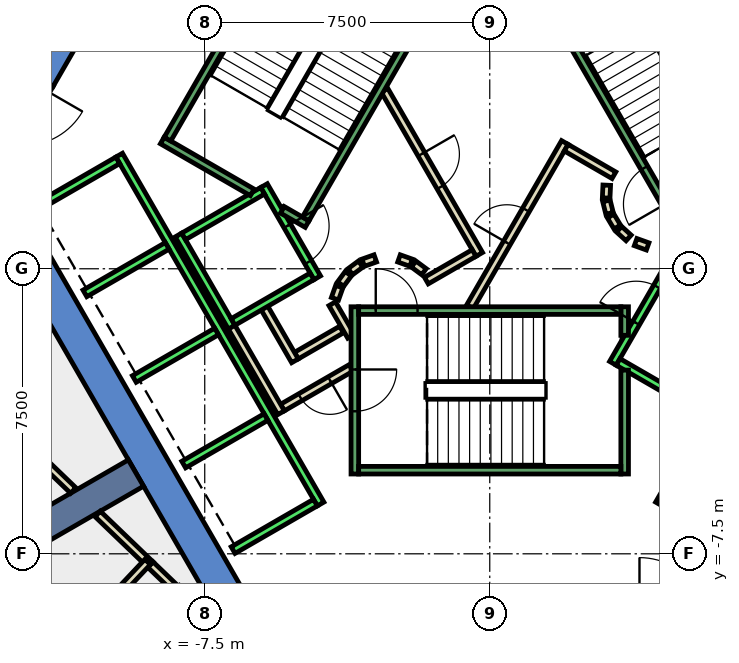
"""IFC4 building model, lengths in metres.
Left out: names, types, materials, properties, quantities, classifications, styles, units other than length and angle.
Written with IfcOpenShell. Run it as: python <this file> out.ifc"""

import sys

from ifc_helpers import new_model, si_unit, direction, frame, frame_2d, origin, place, context, subcontext, project, spatial, polyline, rectangle, outline, extrude, element, fill, save


model = new_model("IFC4")
c1 = context("Model", 3, precision=1e-05, world=origin(), true_north=direction((0.0, 1.0)))
c2 = subcontext(c1, "Body", "Model", "MODEL_VIEW")
j1 = project(units=[si_unit("LENGTHUNIT", "METRE"), si_unit("PLANEANGLEUNIT", "RADIAN")], contexts=[c1])
p1 = place(None, origin())
s1 = spatial("IfcSite", under=j1, at=p1, CompositionType="ELEMENT")
p2 = place(p1, origin())
s2 = spatial("IfcBuilding", under=s1, at=p2, CompositionType="ELEMENT")
p3 = place(p2, frame((0.0, 0.0, 107.6)))
s3 = spatial("IfcBuildingStorey", under=s2, at=p3, CompositionType="ELEMENT", Elevation=107.6)
p4 = place(p3, frame((0.0, 0.0, -0.4)))
e1 = element("IfcWall", 1, at=p4, inside=s3, PredefinedType="SHEAR", context=c2, shape_type="SweptSolid", body=[
    extrude(outline(polyline([(-12.267, 5.252), (-11.488, 4.802), (-6.409, 13.6), (-6.928, 14.5), (-12.267, 5.252)])), origin(), (0.0, 0.0, 1.0), 4.2),
])
p5 = place(p3, frame((0.0, 0.0, 3.6)))
e2 = element("IfcWall", 2, at=p5, inside=s3, PredefinedType="SHEAR", context=c2, shape_type="SweptSolid", body=[
    extrude(outline(polyline([(-13.267, 3.52), (-12.488, 3.07), (-11.488, 4.802), (-12.267, 5.252), (-13.267, 3.52)])), origin(), (0.0, 0.0, 1.0), 0.2),
])
p6 = place(p3, frame((0.0, 0.0, -0.4)))
e3 = element("IfcWall", 3, at=p6, inside=s3, PredefinedType="SHEAR", context=c2, shape_type="SweptSolid", body=[
    extrude(outline(polyline([(-13.856, 2.5), (-6.928, -9.5), (-6.409, -8.6), (-12.817, 2.5), (-13.856, 2.5)])), origin(), (0.0, 0.0, 1.0), 4.2),
])
p7 = place(p3, frame((-9.31, -5.375, -0.4), z_axis=(0.0, 0.0, 1.0), x_axis=(-0.866017533419, -0.500013631625, 0.0)))
e4 = element("IfcWall", 4, at=p7, inside=s3, PredefinedType="SHEAR", context=c2, shape_type="SweptSolid", body=[
    extrude(rectangle(XDim=9.0, YDim=0.8, at=frame_2d((4.5, 0.0))), origin(), (0.0, 0.0, 1.0), 4.2),
])
p8 = place(p3, frame((-3.9, -1.599, 0.0), z_axis=(0.0, 0.0, 1.0), x_axis=(-0.865969445389, -0.500096910261, 0.0)))
e5 = element("IfcWall", 5, at=p8, inside=s3, PredefinedType="PARTITIONING", context=c2, shape_type="SweptSolid", body=[
    extrude(rectangle(XDim=1.373, YDim=0.2, at=frame_2d((0.687, 0.0))), origin(), (0.0, 0.0, 1.0), 3.8),
])
p9 = place(p3, frame((-5.126, -2.422, 0.0), z_axis=(0.0, 0.0, 1.0), x_axis=(-0.500062241894, 0.865989465428, 0.0)))
e6 = element("IfcWall", 6, at=p9, inside=s3, PredefinedType="PARTITIONING", context=c2, shape_type="SweptSolid", body=[
    extrude(rectangle(XDim=1.7, YDim=0.2, at=frame_2d((0.85, 0.0))), origin(), (0.0, 0.0, 1.0), 3.8),
])
p10 = place(p3, frame((-3.65, -2.61, 0.0), z_axis=(0.0, 0.0, 1.0), x_axis=(-0.866072462134, -0.499918483688, 0.0)))
e7 = element("IfcWall", 7, at=p10, inside=s3, PredefinedType="PARTITIONING", context=c2, shape_type="SweptSolid", body=[
    extrude(rectangle(XDim=2.084, YDim=0.2, at=frame_2d((1.042, 0.0))), origin(), (0.0, 0.0, 1.0), 3.8),
])
p11 = place(p10, frame((0.642, 0.0, 0.0)))
e8 = element("IfcOpeningElement", 8, at=p11, cuts=e7, PredefinedType="OPENING", context=c2, shape_type="SweptSolid", body=[
    extrude(rectangle(XDim=0.9, YDim=2.1, at=frame_2d((0.45, 1.05))), frame((0.0, 0.11, 0.0), z_axis=(0.0, -1.0, 0.0), x_axis=(1.0, 0.0, 0.0)), (0.0, 0.0, 1.0), 0.22),
])
p12 = place(p3, frame((-5.492, -3.788, 0.0), z_axis=(0.0, 0.0, 1.0), x_axis=(-0.500008949224, 0.866020236886, 0.0)))
e9 = element("IfcWall", 9, at=p12, inside=s3, PredefinedType="PARTITIONING", context=c2, shape_type="SweptSolid", body=[
    extrude(rectangle(XDim=2.68, YDim=0.2, at=frame_2d((1.34, 0.0))), origin(), (0.0, 0.0, 1.0), 3.8),
])
p13 = place(p3, frame((-4.145, -0.92, 0.0), z_axis=(0.0, 0.0, 1.0), x_axis=(0.499743786207, -0.866173278362, 0.0)))
e10 = element("IfcWall", 10, at=p13, inside=s3, PredefinedType="PARTITIONING", context=c2, shape_type="SweptSolid", body=[
    extrude(rectangle(XDim=0.991, YDim=0.2, at=frame_2d((0.495, 0.0))), origin(), (0.0, 0.0, 1.0), 3.8),
])
p14 = place(p3, frame((-0.52, -1.0, 0.0), z_axis=(0.0, 0.0, 1.0), x_axis=(0.50011622646, 0.865958290007, 0.0)))
e11 = element("IfcWall", 11, at=p14, inside=s3, PredefinedType="PARTITIONING", context=c2, shape_type="SweptSolid", body=[
    extrude(rectangle(XDim=4.991, YDim=0.2, at=frame_2d((2.496, 0.0))), origin(), (0.0, 0.0, 1.0), 3.8),
])
p15 = place(p14, frame((1.945, 0.0, 0.0)))
e12 = element("IfcOpeningElement", 12, at=p15, cuts=e11, PredefinedType="OPENING", context=c2, shape_type="SweptSolid", body=[
    extrude(rectangle(XDim=1.0, YDim=2.1, at=frame_2d((0.5, 1.05))), frame((0.0, 0.11, 0.0), z_axis=(0.0, -1.0, 0.0), x_axis=(1.0, 0.0, 0.0)), (0.0, 0.0, 1.0), 0.22),
])
p16 = place(p3, frame((2.012, 3.186, 0.0), z_axis=(0.0, 0.0, 1.0), x_axis=(0.865891012941, -0.500232699559, 0.0)))
e13 = element("IfcWall", 13, at=p16, inside=s3, PredefinedType="PARTITIONING", context=c2, shape_type="SweptSolid", body=[
    extrude(rectangle(XDim=1.449, YDim=0.2, at=frame_2d((0.725, 0.0))), origin(), (0.0, 0.0, 1.0), 3.8),
])
p17 = place(p3, frame((3.079, 2.199, 0.0), z_axis=(0.0, 0.0, 1.0), x_axis=(-0.047771483479, -0.998858290933, 0.0)))
e14 = element("IfcWall", 14, at=p17, inside=s3, PredefinedType="PARTITIONING", context=c2, shape_type="SweptSolid", body=[
    extrude(rectangle(XDim=0.337, YDim=0.2, at=frame_2d((0.169, 0.0))), origin(), (0.0, 0.0, 1.0), 3.8),
])
p18 = place(p3, frame((3.07, 1.786, 0.0), z_axis=(0.0, 0.0, 1.0), x_axis=(0.242705583207, -0.970099994784, 0.0)))
e15 = element("IfcWall", 15, at=p18, inside=s3, PredefinedType="PARTITIONING", context=c2, shape_type="SweptSolid", body=[
    extrude(rectangle(XDim=0.338, YDim=0.2, at=frame_2d((0.169, 0.0))), origin(), (0.0, 0.0, 1.0), 3.8),
])
for number, where, z_axis, x_axis in (
    (16, (3.182, 1.388, 0.0), (0.0, 0.0, 1.0), (0.512, -0.859, 0.0)),
    (17, (3.404, 1.039, 0.0), (0.0, 0.0, 1.0), (0.74, -0.672, 0.0)),
):
    element("IfcWall", number, at=place(p3, frame(where, z_axis=z_axis, x_axis=x_axis)), inside=s3, PredefinedType="PARTITIONING", context=c2, shape_type="SweptSolid", body=[
        extrude(rectangle(XDim=0.338, YDim=0.2, at=frame_2d((0.169, 0.0))), origin(), (0.0, 0.0, 1.0), 3.8),
    ])
p19 = place(p3, frame((3.838, 0.702, 0.0), z_axis=(0.0, 0.0, 1.0), x_axis=(0.941035081519, -0.338308993895, 0.0)))
e18 = element("IfcWall", 18, at=p19, inside=s3, PredefinedType="PARTITIONING", context=c2, shape_type="SweptSolid", body=[
    extrude(rectangle(XDim=0.337, YDim=0.2, at=frame_2d((0.168, 0.0))), origin(), (0.0, 0.0, 1.0), 3.8),
])
p20 = place(p3, frame((-2.771, 4.7, 0.0), z_axis=(0.0, 0.0, 1.0), x_axis=(0.499969479948, -0.866043023828, 0.0)))
e19 = element("IfcWall", 19, at=p20, inside=s3, PredefinedType="PARTITIONING", context=c2, shape_type="SweptSolid", body=[
    extrude(rectangle(XDim=4.99, YDim=0.2, at=frame_2d((2.495, 0.0))), origin(), (0.0, 0.0, 1.0), 3.8),
])
p21 = place(p20, frame((1.945, 0.0, 0.0)))
e20 = element("IfcOpeningElement", 20, at=p21, cuts=e19, PredefinedType="OPENING", context=c2, shape_type="SweptSolid", body=[
    extrude(rectangle(XDim=1.0, YDim=2.1, at=frame_2d((0.5, 1.05))), frame((0.0, 0.11, 0.0), z_axis=(0.0, -1.0, 0.0), x_axis=(1.0, 0.0, 0.0)), (0.0, 0.0, 1.0), 0.22),
])
p22 = place(p3, frame((-0.412, 0.414, 0.0), z_axis=(0.0, 0.0, 1.0), x_axis=(-0.866017369001, -0.500013916395, 0.0)))
e21 = element("IfcWall", 21, at=p22, inside=s3, PredefinedType="PARTITIONING", context=c2, shape_type="SweptSolid", body=[
    extrude(rectangle(XDim=1.45, YDim=0.2, at=frame_2d((0.725, 0.0))), origin(), (0.0, 0.0, 1.0), 3.8),
])
p23 = place(p3, frame((-1.731, -0.077, 0.0), z_axis=(0.0, 0.0, 1.0), x_axis=(-0.804311165252, 0.594208338422, 0.0)))
e22 = element("IfcWall", 22, at=p23, inside=s3, PredefinedType="PARTITIONING", context=c2, shape_type="SweptSolid", body=[
    extrude(rectangle(XDim=0.338, YDim=0.2, at=frame_2d((0.169, 0.0))), origin(), (0.0, 0.0, 1.0), 3.8),
])
p24 = place(p3, frame((-2.07, 0.16, 0.0), z_axis=(0.0, 0.0, 1.0), x_axis=(-0.942199461132, 0.335052496547, 0.0)))
e23 = element("IfcWall", 23, at=p24, inside=s3, PredefinedType="PARTITIONING", context=c2, shape_type="SweptSolid", body=[
    extrude(rectangle(XDim=0.337, YDim=0.2, at=frame_2d((0.169, 0.0))), origin(), (0.0, 0.0, 1.0), 3.8),
])
p25 = place(p3, frame((-3.012, 0.273, 0.0), z_axis=(0.0, 0.0, 1.0), x_axis=(-0.942280615813, -0.334824194261, 0.0)))
e24 = element("IfcWall", 24, at=p25, inside=s3, PredefinedType="PARTITIONING", context=c2, shape_type="SweptSolid", body=[
    extrude(rectangle(XDim=0.338, YDim=0.2, at=frame_2d((0.169, 0.0))), origin(), (0.0, 0.0, 1.0), 3.8),
])
p26 = place(p3, frame((-3.397, 0.124, 0.0), z_axis=(0.0, 0.0, 1.0), x_axis=(-0.804311165252, -0.594208338422, 0.0)))
e25 = element("IfcWall", 25, at=p26, inside=s3, PredefinedType="PARTITIONING", context=c2, shape_type="SweptSolid", body=[
    extrude(rectangle(XDim=0.338, YDim=0.2, at=frame_2d((0.169, 0.0))), origin(), (0.0, 0.0, 1.0), 3.8),
])
p27 = place(p3, frame((-3.723, -0.131, 0.0), z_axis=(0.0, 0.0, 1.0), x_axis=(-0.594675113454, -0.803966112121, 0.0)))
e26 = element("IfcWall", 26, at=p27, inside=s3, PredefinedType="PARTITIONING", context=c2, shape_type="SweptSolid", body=[
    extrude(rectangle(XDim=0.338, YDim=0.2, at=frame_2d((0.169, 0.0))), origin(), (0.0, 0.0, 1.0), 3.8),
])
p28 = place(p3, frame((-3.96, -0.47, 0.0), z_axis=(0.0, 0.0, 1.0), x_axis=(-0.334824194261, -0.942280615813, 0.0)))
e27 = element("IfcWall", 27, at=p28, inside=s3, PredefinedType="PARTITIONING", context=c2, shape_type="SweptSolid", body=[
    extrude(rectangle(XDim=0.338, YDim=0.2, at=frame_2d((0.169, 0.0))), origin(), (0.0, 0.0, 1.0), 3.8),
])
p29 = place(p3, frame((-8.93, -7.783, 0.0), z_axis=(0.0, 0.0, 1.0), x_axis=(0.720954255291, -0.692982656189, 0.0)))
e28 = element("IfcWall", 28, at=p29, inside=s3, PredefinedType="PARTITIONING", context=c2, shape_type="SweptSolid", body=[
    extrude(rectangle(XDim=0.89, YDim=0.2, at=frame_2d((0.445, 0.0))), origin(), (0.0, 0.0, 1.0), 3.8),
])
p30 = place(p3, frame((-8.93, -7.783, 0.0), z_axis=(0.0, 0.0, 1.0), x_axis=(-0.72124523191, 0.692679807305, 0.0)))
e29 = element("IfcWall", 29, at=p30, inside=s3, PredefinedType="PARTITIONING", context=c2, shape_type="SweptSolid", body=[
    extrude(rectangle(XDim=1.923, YDim=0.2, at=frame_2d((0.961, 0.0))), origin(), (0.0, 0.0, 1.0), 3.8),
])
p31 = place(p3, frame((-13.865, -12.876, 0.0), z_axis=(0.0, 0.0, 1.0), x_axis=(0.685651384846, 0.727930064263, 0.0)))
e30 = element("IfcWall", 30, at=p31, inside=s3, PredefinedType="PARTITIONING", context=c2, shape_type="SweptSolid", body=[
    extrude(rectangle(XDim=7.091, YDim=0.2, at=frame_2d((3.545, 0.0))), origin(), (0.0, 0.0, 1.0), 3.8),
])
p32 = place(p3, frame((-10.96, -5.834, 0.0), z_axis=(0.0, 0.0, 1.0), x_axis=(-0.721236335428, 0.692689070549, 0.0)))
e31 = element("IfcWall", 31, at=p32, inside=s3, PredefinedType="PARTITIONING", context=c2, shape_type="SweptSolid", body=[
    extrude(rectangle(XDim=11.246, YDim=0.2, at=frame_2d((5.623, 0.0))), origin(), (0.0, 0.0, 1.0), 3.8),
])
p33 = place(p3, frame((-5.94, 2.188, 0.0), z_axis=(0.0, 0.0, 1.0), x_axis=(0.49994636267, -0.866056369097, 0.0)))
e32 = element("IfcWall", 32, at=p33, inside=s3, PredefinedType="STANDARD", context=c2, shape_type="SweptSolid", body=[
    extrude(rectangle(XDim=2.8, YDim=0.2, at=frame_2d((1.4, 0.0))), origin(), (0.0, 0.0, 1.0), 3.8),
])
p34 = place(p33, frame((1.225, 0.0, 0.0)))
e33 = element("IfcOpeningElement", 33, at=p34, cuts=e32, PredefinedType="OPENING", context=c2, shape_type="SweptSolid", body=[
    extrude(rectangle(XDim=1.1, YDim=2.1, at=frame_2d((0.55, 1.05))), frame((0.0, 0.11, 0.0), z_axis=(0.0, -1.0, 0.0), x_axis=(1.0, 0.0, 0.0)), (0.0, 0.0, 1.0), 0.22),
])
p35 = place(p3, frame((-8.192, 0.888, 0.0), z_axis=(0.0, 0.0, 1.0), x_axis=(0.49994636267, -0.866056369097, 0.0)))
e34 = element("IfcWall", 34, at=p35, inside=s3, PredefinedType="STANDARD", context=c2, shape_type="SweptSolid", body=[
    extrude(rectangle(XDim=2.8, YDim=0.2, at=frame_2d((1.4, 0.0))), origin(), (0.0, 0.0, 1.0), 3.8),
])
for number, where, z_axis, x_axis in (
    (35, (-5.977, 2.052, 0.0), (0.0, 0.0, 1.0), (-0.866, -0.5, 0.0)),
    (36, (-4.677, -0.2, 0.0), (0.0, 0.0, 1.0), (-0.866, -0.5, 0.0)),
):
    element("IfcWall", number, at=place(p3, frame(where, z_axis=z_axis, x_axis=x_axis)), inside=s3, PredefinedType="STANDARD", context=c2, shape_type="SweptSolid", body=[
        extrude(rectangle(XDim=2.399, YDim=0.2, at=frame_2d((1.2, 0.0))), origin(), (0.0, 0.0, 1.0), 3.8),
    ])
p36 = place(p3, frame((-9.751, 2.99, 0.0), z_axis=(0.0, 0.0, 1.0), x_axis=(0.50000090737, -0.866024879913, 0.0)))
e37 = element("IfcWall", 37, at=p36, inside=s3, PredefinedType="STANDARD", context=c2, shape_type="SweptSolid", body=[
    extrude(rectangle(XDim=10.6, YDim=0.2, at=frame_2d((5.3, 0.0))), origin(), (0.0, 0.0, 1.0), 3.8),
])
p37 = place(p3, frame((-9.788, 2.853, 0.0), z_axis=(0.0, 0.0, 1.0), x_axis=(-0.865998541277, -0.500046524342, 0.0)))
e38 = element("IfcWall", 38, at=p37, inside=s3, PredefinedType="STANDARD", context=c2, shape_type="SweptSolid", body=[
    extrude(rectangle(XDim=2.5, YDim=0.2, at=frame_2d((1.25, 0.0))), origin(), (0.0, 0.0, 1.0), 3.8),
])
for number, where, z_axis, x_axis in (
    (39, (-8.488, 0.602, 0.0), (0.0, 0.0, 1.0), (-0.866, -0.5, 0.0)),
    (40, (-7.188, -1.65, 0.0), (0.0, 0.0, 1.0), (-0.866, -0.5, 0.0)),
    (41, (-5.888, -3.902, 0.0), (0.0, 0.0, 1.0), (-0.866, -0.5, 0.0)),
    (42, (-4.588, -6.153, 0.0), (0.0, 0.0, 1.0), (-0.866, -0.5, 0.0)),
):
    element("IfcWall", number, at=place(p3, frame(where, z_axis=z_axis, x_axis=x_axis)), inside=s3, PredefinedType="STANDARD", context=c2, shape_type="SweptSolid", body=[
        extrude(rectangle(XDim=2.5, YDim=0.2, at=frame_2d((1.25, 0.0))), origin(), (0.0, 0.0, 1.0), 3.8),
    ])
p38 = place(p3, frame((3.24, -2.488, 0.0), z_axis=(0.0, 0.0, 1.0), x_axis=(0.49994636267, 0.866056369097, 0.0)))
e43 = element("IfcWall", 43, at=p38, inside=s3, PredefinedType="STANDARD", context=c2, shape_type="SweptSolid", body=[
    extrude(rectangle(XDim=2.8, YDim=0.2, at=frame_2d((1.4, 0.0))), origin(), (0.0, 0.0, 1.0), 3.8),
])
p39 = place(p38, frame((1.225, 0.0, 0.0)))
e44 = element("IfcOpeningElement", 44, at=p39, cuts=e43, PredefinedType="OPENING", context=c2, shape_type="SweptSolid", body=[
    extrude(rectangle(XDim=1.1, YDim=2.1, at=frame_2d((0.55, 1.05))), frame((0.0, 0.11, 0.0), z_axis=(0.0, -1.0, 0.0), x_axis=(1.0, 0.0, 0.0)), (0.0, 0.0, 1.0), 0.22),
])
p40 = place(p3, frame((3.377, -2.452, 0.0), z_axis=(0.0, 0.0, 1.0), x_axis=(0.865955154139, -0.50012165622, 0.0)))
e45 = element("IfcWall", 45, at=p40, inside=s3, PredefinedType="STANDARD", context=c2, shape_type="SweptSolid", body=[
    extrude(rectangle(XDim=2.4, YDim=0.2, at=frame_2d((1.2, 0.0))), origin(), (0.0, 0.0, 1.0), 3.8),
])
p41 = place(p3, frame((4.451, -6.19, 0.0), z_axis=(0.0, 0.0, 1.0), x_axis=(0.50000090737, 0.866024879913, 0.0)))
e46 = element("IfcWall", 46, at=p41, inside=s3, PredefinedType="STANDARD", context=c2, shape_type="SweptSolid", body=[
    extrude(rectangle(XDim=10.6, YDim=0.2, at=frame_2d((5.3, 0.0))), origin(), (0.0, 0.0, 1.0), 3.8),
])
p42 = place(p3, frame((-3.55, -1.0, 0.0), z_axis=(0.0, 0.0, 1.0), x_axis=(0.0, -1.0, 0.0)))
e47 = element("IfcWall", 47, at=p42, inside=s3, PredefinedType="STANDARD", context=c2, shape_type="SweptSolid", body=[
    extrude(rectangle(XDim=4.4, YDim=0.2, at=frame_2d((2.2, 0.0))), origin(), (0.0, 0.0, 1.0), 3.8),
])
p43 = place(p42, frame((1.65, 0.0, 0.0)))
e48 = element("IfcOpeningElement", 48, at=p43, cuts=e47, PredefinedType="OPENING", context=c2, shape_type="SweptSolid", body=[
    extrude(rectangle(XDim=1.1, YDim=2.2, at=frame_2d((0.55, 1.1))), frame((0.0, 0.11, 0.0), z_axis=(0.0, -1.0, 0.0), x_axis=(1.0, 0.0, 0.0)), (0.0, 0.0, 1.0), 0.22),
])
p44 = place(p3, frame((3.55, -2.667, 0.0), z_axis=(0.0, 0.0, 1.0), x_axis=(0.0, -1.0, 0.0)))
e49 = element("IfcWall", 49, at=p44, inside=s3, PredefinedType="STANDARD", context=c2, shape_type="SweptSolid", body=[
    extrude(rectangle(XDim=2.733, YDim=0.2, at=frame_2d((1.366, 0.0))), origin(), (0.0, 0.0, 1.0), 3.8),
])
p45 = place(p3, frame((3.55, -1.0, 0.0), z_axis=(0.0, 0.0, 1.0), x_axis=(0.0, -1.0, 0.0)))
e50 = element("IfcWall", 50, at=p45, inside=s3, PredefinedType="STANDARD", context=c2, shape_type="SweptSolid", body=[
    extrude(rectangle(XDim=0.751, YDim=0.2, at=frame_2d((0.375, 0.0))), origin(), (0.0, 0.0, 1.0), 3.8),
])
p46 = place(p3, frame((-3.45, -1.1, 0.0), z_axis=(0.0, 0.0, 1.0), x_axis=(1.0, 0.0, 0.0)))
e51 = element("IfcWall", 51, at=p46, inside=s3, PredefinedType="STANDARD", context=c2, shape_type="SweptSolid", body=[
    extrude(rectangle(XDim=6.9, YDim=0.2, at=frame_2d((3.45, 0.0))), origin(), (0.0, 0.0, 1.0), 3.8),
])
p47 = place(p46, frame((0.45, 0.0, 0.0)))
e52 = element("IfcOpeningElement", 52, at=p47, cuts=e51, PredefinedType="OPENING", context=c2, shape_type="SweptSolid", body=[
    extrude(rectangle(XDim=1.1, YDim=2.2, at=frame_2d((0.55, 1.1))), frame((0.0, 0.11, 0.0), z_axis=(0.0, -1.0, 0.0), x_axis=(1.0, 0.0, 0.0)), (0.0, 0.0, 1.0), 0.22),
])
p48 = place(p3, frame((-3.45, -5.3, 0.0), z_axis=(0.0, 0.0, 1.0), x_axis=(1.0, 0.0, 0.0)))
e53 = element("IfcWall", 53, at=p48, inside=s3, PredefinedType="STANDARD", context=c2, shape_type="SweptSolid", body=[
    extrude(rectangle(XDim=6.9, YDim=0.2, at=frame_2d((3.45, 0.0))), origin(), (0.0, 0.0, 1.0), 3.8),
])
p49 = place(p3, frame((4.843, 1.312, 0.0), z_axis=(0.0, 0.0, 1.0), x_axis=(-0.499963383562, 0.866046543262, 0.0)))
e54 = element("IfcWall", 54, at=p49, inside=s3, PredefinedType="STANDARD", context=c2, shape_type="SweptSolid", body=[
    extrude(rectangle(XDim=6.9, YDim=0.2, at=frame_2d((3.45, 0.0))), origin(), (0.0, 0.0, 1.0), 3.8),
])
p50 = place(p49, frame((0.45, 0.0, 0.0)))
e55 = element("IfcOpeningElement", 55, at=p50, cuts=e54, PredefinedType="OPENING", context=c2, shape_type="SweptSolid", body=[
    extrude(rectangle(XDim=1.1, YDim=2.2, at=frame_2d((0.55, 1.1))), frame((0.0, 0.11, 0.0), z_axis=(0.0, -1.0, 0.0), x_axis=(1.0, 0.0, 0.0)), (0.0, 0.0, 1.0), 0.22),
])
p51 = place(p3, frame((-6.25, 2.01, 0.0), z_axis=(0.0, 0.0, 1.0), x_axis=(-0.86611865017, 0.499838457731, 0.0)))
e56 = element("IfcWall", 56, at=p51, inside=s3, PredefinedType="STANDARD", context=c2, shape_type="SweptSolid", body=[
    extrude(rectangle(XDim=2.733, YDim=0.2, at=frame_2d((1.366, 0.0))), origin(), (0.0, 0.0, 1.0), 3.8),
])
p52 = place(p3, frame((-4.806, 1.176, 0.0), z_axis=(0.0, 0.0, 1.0), x_axis=(-0.866558586415, 0.499075361355, 0.0)))
e57 = element("IfcWall", 57, at=p52, inside=s3, PredefinedType="STANDARD", context=c2, shape_type="SweptSolid", body=[
    extrude(rectangle(XDim=0.751, YDim=0.2, at=frame_2d((0.376, 0.0))), origin(), (0.0, 0.0, 1.0), 3.8),
])
p53 = place(p3, frame((-1.393, 7.288, 0.0), z_axis=(0.0, 0.0, 1.0), x_axis=(-0.499963383562, -0.866046543262, 0.0)))
e58 = element("IfcWall", 58, at=p53, inside=s3, PredefinedType="STANDARD", context=c2, shape_type="SweptSolid", body=[
    extrude(rectangle(XDim=6.9, YDim=0.2, at=frame_2d((3.45, 0.0))), origin(), (0.0, 0.0, 1.0), 3.8),
])
p54 = place(p53, frame((0.45, 0.0, 0.0)))
e59 = element("IfcOpeningElement", 59, at=p54, cuts=e58, PredefinedType="OPENING", context=c2, shape_type="SweptSolid", body=[
    extrude(rectangle(XDim=1.1, YDim=2.2, at=frame_2d((0.55, 1.1))), frame((0.0, 0.11, 0.0), z_axis=(0.0, -1.0, 0.0), x_axis=(1.0, 0.0, 0.0)), (0.0, 0.0, 1.0), 0.22),
])
p55 = place(p3, frame((-5.03, 9.388, 0.0), z_axis=(0.0, 0.0, 1.0), x_axis=(-0.499978703459, -0.866037698999, 0.0)))
e60 = element("IfcWall", 60, at=p55, inside=s3, PredefinedType="STANDARD", context=c2, shape_type="SweptSolid", body=[
    extrude(rectangle(XDim=6.9, YDim=0.2, at=frame_2d((3.45, 0.0))), origin(), (0.0, 0.0, 1.0), 3.8),
])
p56 = place(p15, origin())
e61 = element("IfcDoor", 61, at=p56, inside=s3, OperationType="SINGLE_SWING_LEFT", PredefinedType="DOOR", context=c2, shape_type="SweptSolid", body=[
    extrude(rectangle(XDim=1.0, YDim=2.1, at=frame_2d((0.5, 1.05))), frame((0.0, 0.025, 0.0), z_axis=(0.0, -1.0, 0.0), x_axis=(1.0, 0.0, 0.0)), (0.0, 0.0, 1.0), 0.05),
])
fill(e12, e61)
p57 = place(p21, origin())
e62 = element("IfcDoor", 62, at=p57, inside=s3, OperationType="SINGLE_SWING_RIGHT", PredefinedType="DOOR", context=c2, shape_type="SweptSolid", body=[
    extrude(rectangle(XDim=1.0, YDim=2.1, at=frame_2d((0.5, 1.05))), frame((0.0, 0.025, 0.0), z_axis=(0.0, -1.0, 0.0), x_axis=(1.0, 0.0, 0.0)), (0.0, 0.0, 1.0), 0.05),
])
fill(e20, e62)
p58 = place(p11, origin())
e63 = element("IfcDoor", 63, at=p58, inside=s3, OperationType="SINGLE_SWING_LEFT", PredefinedType="DOOR", context=c2, shape_type="SweptSolid", body=[
    extrude(rectangle(XDim=0.9, YDim=2.1, at=frame_2d((0.45, 1.05))), frame((0.0, 0.025, 0.0), z_axis=(0.0, -1.0, 0.0), x_axis=(1.0, 0.0, 0.0)), (0.0, 0.0, 1.0), 0.05),
])
fill(e8, e63)
p59 = place(p39, origin())
e64 = element("IfcDoor", 64, at=p59, inside=s3, OperationType="SLIDING_TO_LEFT", PredefinedType="DOOR", context=c2, shape_type="SweptSolid", body=[
    extrude(rectangle(XDim=1.1, YDim=2.1, at=frame_2d((0.55, 1.05))), frame((0.0, 0.025, 0.0), z_axis=(0.0, -1.0, 0.0), x_axis=(1.0, 0.0, 0.0)), (0.0, 0.0, 1.0), 0.05),
])
fill(e44, e64)
p60 = place(p34, origin())
e65 = element("IfcDoor", 65, at=p60, inside=s3, OperationType="SLIDING_TO_LEFT", PredefinedType="DOOR", context=c2, shape_type="SweptSolid", body=[
    extrude(rectangle(XDim=1.1, YDim=2.1, at=frame_2d((0.55, 1.05))), frame((0.0, 0.025, 0.0), z_axis=(0.0, -1.0, 0.0), x_axis=(1.0, 0.0, 0.0)), (0.0, 0.0, 1.0), 0.05),
])
fill(e33, e65)
p61 = place(p47, origin())
e66 = element("IfcDoor", 66, at=p61, inside=s3, OperationType="SINGLE_SWING_LEFT", PredefinedType="DOOR", context=c2, shape_type="SweptSolid", body=[
    extrude(rectangle(XDim=1.1, YDim=2.2, at=frame_2d((0.55, 1.1))), frame((0.0, 0.025, 0.0), z_axis=(0.0, -1.0, 0.0), x_axis=(1.0, 0.0, 0.0)), (0.0, 0.0, 1.0), 0.05),
])
fill(e52, e66)
p62 = place(p43, origin())
e67 = element("IfcDoor", 67, at=p62, inside=s3, OperationType="SINGLE_SWING_LEFT", PredefinedType="DOOR", context=c2, shape_type="SweptSolid", body=[
    extrude(rectangle(XDim=1.1, YDim=2.2, at=frame_2d((0.55, 1.1))), frame((0.0, 0.025, 0.0), z_axis=(0.0, -1.0, 0.0), x_axis=(1.0, 0.0, 0.0)), (0.0, 0.0, 1.0), 0.05),
])
fill(e48, e67)
p63 = place(p50, origin())
e68 = element("IfcDoor", 68, at=p63, inside=s3, OperationType="SINGLE_SWING_LEFT", PredefinedType="DOOR", context=c2, shape_type="SweptSolid", body=[
    extrude(rectangle(XDim=1.1, YDim=2.2, at=frame_2d((0.55, 1.1))), frame((0.0, 0.025, 0.0), z_axis=(0.0, -1.0, 0.0), x_axis=(1.0, 0.0, 0.0)), (0.0, 0.0, 1.0), 0.05),
])
fill(e55, e68)
save(model, sys.argv[1])
